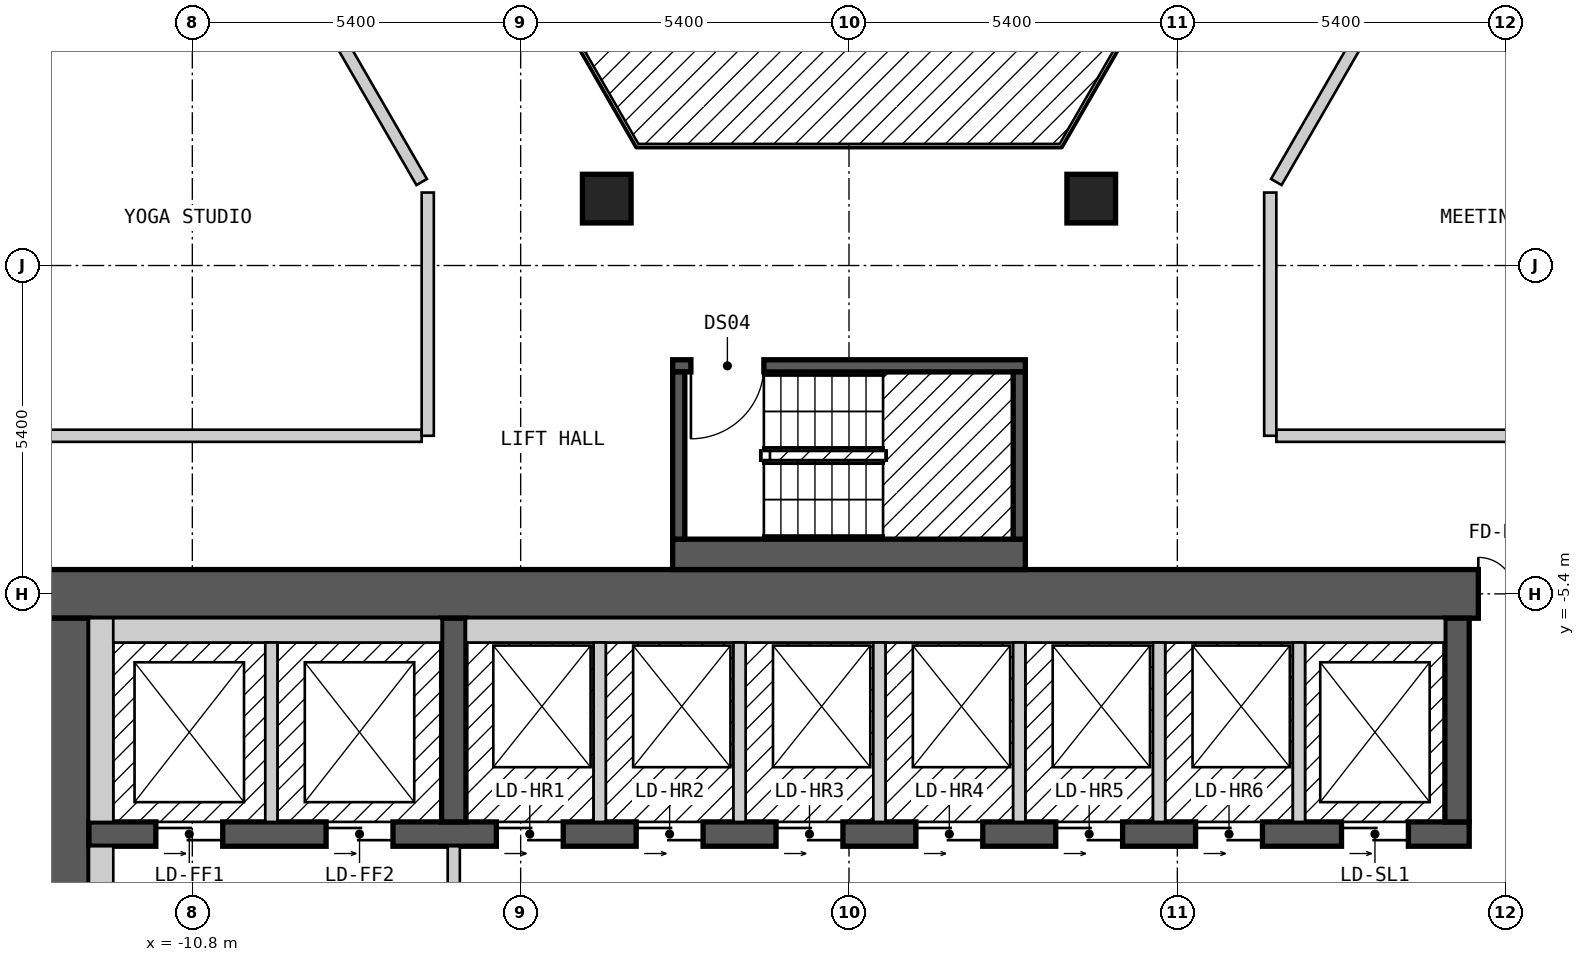
"""IFC4 building model, lengths in metres.
Left out: names, types, materials, properties, quantities, classifications, styles, units other than length and angle.
Written with IfcOpenShell. Run it as: python <this file> out.ifc"""

import sys

from ifc_helpers import new_model, si_unit, direction, frame, frame_2d, origin, origin_2d, place, context, subcontext, project, spatial, rectangle, extrude, element, fill, save


model = new_model("IFC4")
c1 = context("Model", 3, precision=1e-05, world=origin(), true_north=direction((0.0, 1.0)))
c2 = subcontext(c1, "Body", "Model", "MODEL_VIEW")
j1 = project(units=[si_unit("LENGTHUNIT", "METRE"), si_unit("PLANEANGLEUNIT", "RADIAN")], contexts=[c1])
p1 = place(None, origin())
s1 = spatial("IfcSite", under=j1, at=p1, CompositionType="ELEMENT")
p2 = place(p1, origin())
s2 = spatial("IfcBuilding", under=s1, at=p2, CompositionType="ELEMENT")
p3 = place(p2, frame((0.0, 0.0, 135.6)))
s3 = spatial("IfcBuildingStorey", under=s2, at=p3, CompositionType="ELEMENT", Elevation=135.6)
for number, where, z_axis, x_axis in (
    (1, (3.984, 1.1, 0.0), (0.0, 0.0, 1.0), (1.0, 0.0, 0.0)),
    (2, (-3.984, 1.1, 0.0), (0.0, 0.0, 1.0), (1.0, 0.0, 0.0)),
):
    element("IfcColumn", number, at=place(p3, frame(where, z_axis=z_axis, x_axis=x_axis)), inside=s3, PredefinedType="COLUMN", context=c2, shape_type="SweptSolid", body=[
        extrude(rectangle(XDim=0.8, YDim=0.8, at=origin_2d()), origin(), (0.0, 0.0, 1.0), 3.0),
    ])
p4 = place(p3, frame((-13.3, -5.4, 0.0), z_axis=(0.0, 0.0, 1.0), x_axis=(1.0, 0.0, 0.0)))
e3 = element("IfcWall", 3, at=p4, inside=s3, PredefinedType="SHEAR", context=c2, shape_type="SweptSolid", body=[
    extrude(rectangle(XDim=26.6, YDim=0.8, at=frame_2d((13.3, 0.0))), origin(), (0.0, 0.0, 1.0), 2.7),
])
p5 = place(p4, frame((23.65, 0.0, 0.0)))
e4 = element("IfcOpeningElement", 4, at=p5, cuts=e3, PredefinedType="OPENING", context=c2, shape_type="SweptSolid", body=[
    extrude(rectangle(XDim=1.2, YDim=2.1, at=frame_2d((0.6, 1.05))), frame((0.0, 0.41, 0.0), z_axis=(0.0, -1.0, 0.0), x_axis=(1.0, 0.0, 0.0)), (0.0, 0.0, 1.0), 0.82),
])
p6 = place(p3, frame((-12.9, -18.2, 0.0), z_axis=(0.0, 0.0, 1.0), x_axis=(0.0, 1.0, 0.0)))
e5 = element("IfcWall", 5, at=p6, inside=s3, PredefinedType="SHEAR", context=c2, shape_type="SweptSolid", body=[
    extrude(rectangle(XDim=12.4, YDim=0.8, at=frame_2d((6.2, 0.0))), origin(), (0.0, 0.0, 1.0), 2.7),
])
p7 = place(p6, frame((4.0, 0.0, 0.0)))
e6 = element("IfcOpeningElement", 6, at=p7, cuts=e5, PredefinedType="OPENING", context=c2, shape_type="SweptSolid", body=[
    extrude(rectangle(XDim=1.2, YDim=2.1, at=frame_2d((0.6, 1.05))), frame((0.0, 0.41, 0.0), z_axis=(0.0, -1.0, 0.0), x_axis=(1.0, 0.0, 0.0)), (0.0, 0.0, 1.0), 0.82),
])
p8 = place(p3, frame((-12.5, -9.35, 0.0), z_axis=(0.0, 0.0, 1.0), x_axis=(1.0, 0.0, 0.0)))
e7 = element("IfcWall", 7, at=p8, inside=s3, PredefinedType="SHEAR", context=c2, shape_type="SweptSolid", body=[
    extrude(rectangle(XDim=22.7, YDim=0.4, at=frame_2d((11.35, 0.0))), origin(), (0.0, 0.0, 1.0), 2.7),
])
p9 = place(p8, frame((1.1, 0.0, 0.0)))
e8 = element("IfcOpeningElement", 8, at=p9, cuts=e7, PredefinedType="OPENING", context=c2, shape_type="SweptSolid", body=[
    extrude(rectangle(XDim=1.1, YDim=2.1, at=frame_2d((0.55, 1.05))), frame((0.0, 0.21, 0.0), z_axis=(0.0, -1.0, 0.0), x_axis=(1.0, 0.0, 0.0)), (0.0, 0.0, 1.0), 0.42),
])
p10 = place(p8, frame((3.9, 0.0, 0.0)))
e9 = element("IfcOpeningElement", 9, at=p10, cuts=e7, PredefinedType="OPENING", context=c2, shape_type="SweptSolid", body=[
    extrude(rectangle(XDim=1.1, YDim=2.1, at=frame_2d((0.55, 1.05))), frame((0.0, 0.21, 0.0), z_axis=(0.0, -1.0, 0.0), x_axis=(1.0, 0.0, 0.0)), (0.0, 0.0, 1.0), 0.42),
])
p11 = place(p8, frame((6.7, 0.0, 0.0)))
e10 = element("IfcOpeningElement", 10, at=p11, cuts=e7, PredefinedType="OPENING", context=c2, shape_type="SweptSolid", body=[
    extrude(rectangle(XDim=1.1, YDim=2.1, at=frame_2d((0.55, 1.05))), frame((0.0, 0.21, 0.0), z_axis=(0.0, -1.0, 0.0), x_axis=(1.0, 0.0, 0.0)), (0.0, 0.0, 1.0), 0.42),
])
p12 = place(p8, frame((9.0, 0.0, 0.0)))
e11 = element("IfcOpeningElement", 11, at=p12, cuts=e7, PredefinedType="OPENING", context=c2, shape_type="SweptSolid", body=[
    extrude(rectangle(XDim=1.1, YDim=2.1, at=frame_2d((0.55, 1.05))), frame((0.0, 0.21, 0.0), z_axis=(0.0, -1.0, 0.0), x_axis=(1.0, 0.0, 0.0)), (0.0, 0.0, 1.0), 0.42),
])
p13 = place(p8, frame((11.3, 0.0, 0.0)))
e12 = element("IfcOpeningElement", 12, at=p13, cuts=e7, PredefinedType="OPENING", context=c2, shape_type="SweptSolid", body=[
    extrude(rectangle(XDim=1.1, YDim=2.1, at=frame_2d((0.55, 1.05))), frame((0.0, 0.21, 0.0), z_axis=(0.0, -1.0, 0.0), x_axis=(1.0, 0.0, 0.0)), (0.0, 0.0, 1.0), 0.42),
])
p14 = place(p8, frame((13.6, 0.0, 0.0)))
e13 = element("IfcOpeningElement", 13, at=p14, cuts=e7, PredefinedType="OPENING", context=c2, shape_type="SweptSolid", body=[
    extrude(rectangle(XDim=1.1, YDim=2.1, at=frame_2d((0.55, 1.05))), frame((0.0, 0.21, 0.0), z_axis=(0.0, -1.0, 0.0), x_axis=(1.0, 0.0, 0.0)), (0.0, 0.0, 1.0), 0.42),
])
p15 = place(p8, frame((15.9, 0.0, 0.0)))
e14 = element("IfcOpeningElement", 14, at=p15, cuts=e7, PredefinedType="OPENING", context=c2, shape_type="SweptSolid", body=[
    extrude(rectangle(XDim=1.1, YDim=2.1, at=frame_2d((0.55, 1.05))), frame((0.0, 0.21, 0.0), z_axis=(0.0, -1.0, 0.0), x_axis=(1.0, 0.0, 0.0)), (0.0, 0.0, 1.0), 0.42),
])
p16 = place(p8, frame((18.2, 0.0, 0.0)))
e15 = element("IfcOpeningElement", 15, at=p16, cuts=e7, PredefinedType="OPENING", context=c2, shape_type="SweptSolid", body=[
    extrude(rectangle(XDim=1.1, YDim=2.1, at=frame_2d((0.55, 1.05))), frame((0.0, 0.21, 0.0), z_axis=(0.0, -1.0, 0.0), x_axis=(1.0, 0.0, 0.0)), (0.0, 0.0, 1.0), 0.42),
])
p17 = place(p8, frame((20.6, 0.0, 0.0)))
e16 = element("IfcOpeningElement", 16, at=p17, cuts=e7, PredefinedType="OPENING", context=c2, shape_type="SweptSolid", body=[
    extrude(rectangle(XDim=1.1, YDim=2.1, at=frame_2d((0.55, 1.05))), frame((0.0, 0.21, 0.0), z_axis=(0.0, -1.0, 0.0), x_axis=(1.0, 0.0, 0.0)), (0.0, 0.0, 1.0), 0.42),
])
for number, where, z_axis, x_axis in (
    (17, (-6.5, -9.15, 0.0), (0.0, 0.0, 1.0), (0.0, 1.0, 0.0)),
    (18, (10.0, -9.15, 0.0), (0.0, 0.0, 1.0), (0.0, 1.0, 0.0)),
):
    element("IfcWall", number, at=place(p3, frame(where, z_axis=z_axis, x_axis=x_axis)), inside=s3, PredefinedType="SHEAR", context=c2, shape_type="SweptSolid", body=[
        extrude(rectangle(XDim=3.35, YDim=0.4, at=frame_2d((1.675, 0.0))), origin(), (0.0, 0.0, 1.0), 2.7),
    ])
p18 = place(p3, frame((-2.9, -4.75, 0.0), z_axis=(0.0, 0.0, 1.0), x_axis=(1.0, 0.0, 0.0)))
e19 = element("IfcWall", 19, at=p18, inside=s3, PredefinedType="SOLIDWALL", context=c2, shape_type="SweptSolid", body=[
    extrude(rectangle(XDim=5.8, YDim=0.5, at=frame_2d((2.9, 0.0))), origin(), (0.0, 0.0, 1.0), 2.7),
])
p19 = place(p3, frame((-2.9, -1.65, 0.0), z_axis=(0.0, 0.0, 1.0), x_axis=(1.0, 0.0, 0.0)))
e20 = element("IfcWall", 20, at=p19, inside=s3, PredefinedType="SOLIDWALL", context=c2, shape_type="SweptSolid", body=[
    extrude(rectangle(XDim=5.8, YDim=0.2, at=frame_2d((2.9, 0.0))), origin(), (0.0, 0.0, 1.0), 2.7),
])
p20 = place(p19, frame((0.3, 0.0, 0.0)))
e21 = element("IfcOpeningElement", 21, at=p20, cuts=e20, PredefinedType="OPENING", context=c2, shape_type="SweptSolid", body=[
    extrude(rectangle(XDim=1.2, YDim=2.1, at=frame_2d((0.6, 1.05))), frame((0.0, 0.11, 0.0), z_axis=(0.0, -1.0, 0.0), x_axis=(1.0, 0.0, 0.0)), (0.0, 0.0, 1.0), 0.22),
])
for number, where, z_axis, x_axis in (
    (22, (-2.8, -4.5, 0.0), (0.0, 0.0, 1.0), (0.0, 1.0, 0.0)),
    (23, (2.8, -4.5, 0.0), (0.0, 0.0, 1.0), (0.0, 1.0, 0.0)),
):
    element("IfcWall", number, at=place(p3, frame(where, z_axis=z_axis, x_axis=x_axis)), inside=s3, PredefinedType="SOLIDWALL", context=c2, shape_type="SweptSolid", body=[
        extrude(rectangle(XDim=2.75, YDim=0.2, at=frame_2d((1.375, 0.0))), origin(), (0.0, 0.0, 1.0), 2.7),
    ])
p21 = place(p3, frame((-10.796, 7.9, 0.0), z_axis=(0.0, 0.0, 1.0), x_axis=(0.499954271211, -0.866051803703, 0.0)))
e24 = element("IfcWall", 24, at=p21, inside=s3, PredefinedType="PARTITIONING", context=c2, shape_type="SweptSolid", body=[
    extrude(rectangle(XDim=7.536, YDim=0.2, at=frame_2d((3.768, 0.0))), origin(), (0.0, 0.0, 1.0), 2.7),
])
p22 = place(p3, frame((7.967, 13.0, 0.0), z_axis=(0.0, 0.0, 1.0), x_axis=(0.50003774998, -0.866003607726, 0.0)))
e25 = element("IfcWall", 25, at=p22, inside=s3, PredefinedType="PARTITIONING", context=c2, shape_type="SweptSolid", body=[
    extrude(rectangle(XDim=14.433, YDim=0.2, at=frame_2d((7.217, 0.0))), origin(), (0.0, 0.0, 1.0), 2.7),
])
p23 = place(p22, frame((6.824, 0.0, 0.0)))
e26 = element("IfcOpeningElement", 26, at=p23, cuts=e25, PredefinedType="OPENING", context=c2, shape_type="SweptSolid", body=[
    extrude(rectangle(XDim=0.9, YDim=2.1, at=frame_2d((0.45, 1.05))), frame((0.0, 0.11, 0.0), z_axis=(0.0, -1.0, 0.0), x_axis=(1.0, 0.0, 0.0)), (0.0, 0.0, 1.0), 0.22),
])
p24 = place(p3, frame((9.296, 15.1, 0.0), z_axis=(0.0, 0.0, 1.0), x_axis=(0.499974024244, -0.866040400375, 0.0)))
e27 = element("IfcWall", 27, at=p24, inside=s3, PredefinedType="PARTITIONING", context=c2, shape_type="SweptSolid", body=[
    extrude(rectangle(XDim=16.857, YDim=0.2, at=frame_2d((8.429, 0.0))), origin(), (0.0, 0.0, 1.0), 2.7),
])
p25 = place(p24, frame((5.209, 0.0, 0.0)))
e28 = element("IfcOpeningElement", 28, at=p25, cuts=e27, PredefinedType="OPENING", context=c2, shape_type="SweptSolid", body=[
    extrude(rectangle(XDim=1.0, YDim=2.1, at=frame_2d((0.5, 1.05))), frame((0.0, 0.11, 0.0), z_axis=(0.0, -1.0, 0.0), x_axis=(1.0, 0.0, 0.0)), (0.0, 0.0, 1.0), 0.22),
])
p26 = place(p3, frame((-13.395, -2.8, 0.0), z_axis=(0.0, 0.0, 1.0), x_axis=(1.0, 0.0, 0.0)))
e29 = element("IfcWall", 29, at=p26, inside=s3, PredefinedType="PARTITIONING", context=c2, shape_type="SweptSolid", body=[
    extrude(rectangle(XDim=6.367, YDim=0.2, at=frame_2d((3.184, 0.0))), origin(), (0.0, 0.0, 1.0), 2.7),
])
p27 = place(p3, frame((7.028, -2.8, 0.0), z_axis=(0.0, 0.0, 1.0), x_axis=(1.0, 0.0, 0.0)))
e30 = element("IfcWall", 30, at=p27, inside=s3, PredefinedType="PARTITIONING", context=c2, shape_type="SweptSolid", body=[
    extrude(rectangle(XDim=6.25, YDim=0.2, at=frame_2d((3.125, 0.0))), origin(), (0.0, 0.0, 1.0), 2.7),
])
p28 = place(p3, frame((7.028, 1.373, 0.0), z_axis=(0.0, 0.0, 1.0), x_axis=(0.499954271211, 0.866051803703, 0.0)))
e31 = element("IfcWall", 31, at=p28, inside=s3, PredefinedType="PARTITIONING", context=c2, shape_type="SweptSolid", body=[
    extrude(rectangle(XDim=7.536, YDim=0.2, at=frame_2d((3.768, 0.0))), origin(), (0.0, 0.0, 1.0), 2.7),
])
p29 = place(p3, frame((-15.242, 0.399, 0.0), z_axis=(0.0, 0.0, 1.0), x_axis=(0.499953615651, 0.866052182145, 0.0)))
e32 = element("IfcWall", 32, at=p29, inside=s3, PredefinedType="PARTITIONING", context=c2, shape_type="SweptSolid", body=[
    extrude(rectangle(XDim=8.777, YDim=0.2, at=frame_2d((4.388, 0.0))), origin(), (0.0, 0.0, 1.0), 2.7),
])
p30 = place(p29, frame((3.938, 0.0, 0.0)))
e33 = element("IfcOpeningElement", 33, at=p30, cuts=e32, PredefinedType="OPENING", context=c2, shape_type="SweptSolid", body=[
    extrude(rectangle(XDim=0.9, YDim=2.1, at=frame_2d((0.45, 1.05))), frame((0.0, 0.11, 0.0), z_axis=(0.0, -1.0, 0.0), x_axis=(1.0, 0.0, 0.0)), (0.0, 0.0, 1.0), 0.22),
])
p31 = place(p3, frame((-17.724, 0.5, 0.0), z_axis=(0.0, 0.0, 1.0), x_axis=(0.499994801602, 0.86602840506, 0.0)))
e34 = element("IfcWall", 34, at=p31, inside=s3, PredefinedType="PARTITIONING", context=c2, shape_type="SweptSolid", body=[
    extrude(rectangle(XDim=16.916, YDim=0.2, at=frame_2d((8.458, 0.0))), origin(), (0.0, 0.0, 1.0), 2.7),
])
p32 = place(p31, frame((10.672, 0.0, 0.0)))
e35 = element("IfcOpeningElement", 35, at=p32, cuts=e34, PredefinedType="OPENING", context=c2, shape_type="SweptSolid", body=[
    extrude(rectangle(XDim=1.0, YDim=2.1, at=frame_2d((0.5, 1.05))), frame((0.0, 0.11, 0.0), z_axis=(0.0, -1.0, 0.0), x_axis=(1.0, 0.0, 0.0)), (0.0, 0.0, 1.0), 0.22),
])
p33 = place(p31, frame((5.187, 0.0, 0.0)))
e36 = element("IfcOpeningElement", 36, at=p33, cuts=e34, PredefinedType="OPENING", context=c2, shape_type="SweptSolid", body=[
    extrude(rectangle(XDim=1.0, YDim=2.1, at=frame_2d((0.5, 1.05))), frame((0.0, 0.11, 0.0), z_axis=(0.0, -1.0, 0.0), x_axis=(1.0, 0.0, 0.0)), (0.0, 0.0, 1.0), 0.22),
])
p34 = place(p31, frame((0.566, 0.0, 0.0)))
e37 = element("IfcOpeningElement", 37, at=p34, cuts=e34, PredefinedType="OPENING", context=c2, shape_type="SweptSolid", body=[
    extrude(rectangle(XDim=1.0, YDim=2.1, at=frame_2d((0.5, 1.05))), frame((0.0, 0.11, 0.0), z_axis=(0.0, -1.0, 0.0), x_axis=(1.0, 0.0, 0.0)), (0.0, 0.0, 1.0), 0.22),
])
for number, where, z_axis, x_axis in (
    (38, (6.928, -2.8, 0.0), (0.0, 0.0, 1.0), (0.0, 1.0, 0.0)),
    (39, (-6.928, -2.8, 0.0), (0.0, 0.0, 1.0), (0.0, 1.0, 0.0)),
):
    element("IfcWall", number, at=place(p3, frame(where, z_axis=z_axis, x_axis=x_axis)), inside=s3, PredefinedType="PARTITIONING", context=c2, shape_type="SweptSolid", body=[
        extrude(rectangle(XDim=4.0, YDim=0.2, at=frame_2d((2.0, 0.0))), origin(), (0.0, 0.0, 1.0), 2.7),
    ])
p35 = place(p3, frame((-12.3, -13.0, 0.0), z_axis=(0.0, 0.0, 1.0), x_axis=(0.0, 1.0, 0.0)))
e40 = element("IfcWall", 40, at=p35, inside=s3, PredefinedType="PARTITIONING", context=c2, shape_type="SweptSolid", body=[
    extrude(rectangle(XDim=3.45, YDim=0.4, at=frame_2d((1.725, 0.0))), origin(), (0.0, 0.0, 1.0), 2.7),
])
p36 = place(p3, frame((-12.3, -9.15, 0.0), z_axis=(0.0, 0.0, 1.0), x_axis=(0.0, 1.0, 0.0)))
e41 = element("IfcWall", 41, at=p36, inside=s3, PredefinedType="SOLIDWALL", context=c2, shape_type="SweptSolid", body=[
    extrude(rectangle(XDim=3.35, YDim=0.4, at=frame_2d((1.675, 0.0))), origin(), (0.0, 0.0, 1.0), 2.7),
])
p37 = place(p3, frame((-12.1, -6.0, 0.0), z_axis=(0.0, 0.0, 1.0), x_axis=(1.0, 0.0, 0.0)))
e42 = element("IfcWall", 42, at=p37, inside=s3, PredefinedType="SOLIDWALL", context=c2, shape_type="SweptSolid", body=[
    extrude(rectangle(XDim=5.4, YDim=0.4, at=frame_2d((2.7, 0.0))), origin(), (0.0, 0.0, 1.0), 2.7),
])
p38 = place(p3, frame((-9.5, -9.15, 0.0), z_axis=(0.0, 0.0, 1.0), x_axis=(0.0, 1.0, 0.0)))
e43 = element("IfcWall", 43, at=p38, inside=s3, PredefinedType="SOLIDWALL", context=c2, shape_type="SweptSolid", body=[
    extrude(rectangle(XDim=2.95, YDim=0.2, at=frame_2d((1.475, 0.0))), origin(), (0.0, 0.0, 1.0), 2.7),
])
p39 = place(p3, frame((-6.5, -14.45, 0.0), z_axis=(0.0, 0.0, 1.0), x_axis=(0.0, 1.0, 0.0)))
e44 = element("IfcWall", 44, at=p39, inside=s3, PredefinedType="PARTITIONING", context=c2, shape_type="SweptSolid", body=[
    extrude(rectangle(XDim=4.9, YDim=0.2, at=frame_2d((2.45, 0.0))), origin(), (0.0, 0.0, 1.0), 2.7),
])
p40 = place(p39, frame((3.15, 0.0, 0.0), z_axis=(0.0, 0.0, 1.0), x_axis=(-1.0, 0.0, 0.0)))
e45 = element("IfcOpeningElement", 45, at=p40, cuts=e44, PredefinedType="OPENING", context=c2, shape_type="SweptSolid", body=[
    extrude(rectangle(XDim=1.4, YDim=2.1, at=frame_2d((0.7, 1.05))), frame((0.0, 0.11, 0.0), z_axis=(0.0, -1.0, 0.0), x_axis=(1.0, 0.0, 0.0)), (0.0, 0.0, 1.0), 0.22),
])
p41 = place(p3, frame((-6.3, -6.0, 0.0), z_axis=(0.0, 0.0, 1.0), x_axis=(1.0, 0.0, 0.0)))
e46 = element("IfcWall", 46, at=p41, inside=s3, PredefinedType="SOLIDWALL", context=c2, shape_type="SweptSolid", body=[
    extrude(rectangle(XDim=16.1, YDim=0.4, at=frame_2d((8.05, 0.0))), origin(), (0.0, 0.0, 1.0), 2.7),
])
for number, where, z_axis, x_axis in (
    (47, (-4.1, -9.15, 0.0), (0.0, 0.0, 1.0), (0.0, 1.0, 0.0)),
    (48, (-1.8, -9.15, 0.0), (0.0, 0.0, 1.0), (0.0, 1.0, 0.0)),
    (49, (0.5, -9.15, 0.0), (0.0, 0.0, 1.0), (0.0, 1.0, 0.0)),
    (50, (2.8, -9.15, 0.0), (0.0, 0.0, 1.0), (0.0, 1.0, 0.0)),
    (51, (5.1, -9.15, 0.0), (0.0, 0.0, 1.0), (0.0, 1.0, 0.0)),
    (52, (7.4, -9.15, 0.0), (0.0, 0.0, 1.0), (0.0, 1.0, 0.0)),
):
    element("IfcWall", number, at=place(p3, frame(where, z_axis=z_axis, x_axis=x_axis)), inside=s3, PredefinedType="SOLIDWALL", context=c2, shape_type="SweptSolid", body=[
        extrude(rectangle(XDim=2.95, YDim=0.2, at=frame_2d((1.475, 0.0))), origin(), (0.0, 0.0, 1.0), 2.7),
    ])
p42 = place(p20, origin())
e53 = element("IfcDoor", 53, at=p42, inside=s3, OperationType="SINGLE_SWING_LEFT", PredefinedType="DOOR", context=c2, shape_type="SweptSolid", body=[
    extrude(rectangle(XDim=1.2, YDim=2.1, at=frame_2d((0.6, 1.05))), frame((0.0, 0.025, 0.0), z_axis=(0.0, -1.0, 0.0), x_axis=(1.0, 0.0, 0.0)), (0.0, 0.0, 1.0), 0.05),
])
fill(e21, e53)
p43 = place(p9, origin())
e54 = element("IfcDoor", 54, at=p43, inside=s3, OperationType="DOUBLE_DOOR_SLIDING", PredefinedType="DOOR", context=c2, shape_type="SweptSolid", body=[
    extrude(rectangle(XDim=1.1, YDim=2.1, at=frame_2d((0.55, 1.05))), frame((0.0, 0.025, 0.0), z_axis=(0.0, -1.0, 0.0), x_axis=(1.0, 0.0, 0.0)), (0.0, 0.0, 1.0), 0.05),
])
fill(e8, e54)
p44 = place(p10, origin())
e55 = element("IfcDoor", 55, at=p44, inside=s3, OperationType="DOUBLE_DOOR_SLIDING", PredefinedType="DOOR", context=c2, shape_type="SweptSolid", body=[
    extrude(rectangle(XDim=1.1, YDim=2.1, at=frame_2d((0.55, 1.05))), frame((0.0, 0.025, 0.0), z_axis=(0.0, -1.0, 0.0), x_axis=(1.0, 0.0, 0.0)), (0.0, 0.0, 1.0), 0.05),
])
fill(e9, e55)
p45 = place(p11, origin())
e56 = element("IfcDoor", 56, at=p45, inside=s3, OperationType="DOUBLE_DOOR_SLIDING", PredefinedType="DOOR", context=c2, shape_type="SweptSolid", body=[
    extrude(rectangle(XDim=1.1, YDim=2.1, at=frame_2d((0.55, 1.05))), frame((0.0, 0.025, 0.0), z_axis=(0.0, -1.0, 0.0), x_axis=(1.0, 0.0, 0.0)), (0.0, 0.0, 1.0), 0.05),
])
fill(e10, e56)
p46 = place(p12, origin())
e57 = element("IfcDoor", 57, at=p46, inside=s3, OperationType="DOUBLE_DOOR_SLIDING", PredefinedType="DOOR", context=c2, shape_type="SweptSolid", body=[
    extrude(rectangle(XDim=1.1, YDim=2.1, at=frame_2d((0.55, 1.05))), frame((0.0, 0.025, 0.0), z_axis=(0.0, -1.0, 0.0), x_axis=(1.0, 0.0, 0.0)), (0.0, 0.0, 1.0), 0.05),
])
fill(e11, e57)
p47 = place(p13, origin())
e58 = element("IfcDoor", 58, at=p47, inside=s3, OperationType="DOUBLE_DOOR_SLIDING", PredefinedType="DOOR", context=c2, shape_type="SweptSolid", body=[
    extrude(rectangle(XDim=1.1, YDim=2.1, at=frame_2d((0.55, 1.05))), frame((0.0, 0.025, 0.0), z_axis=(0.0, -1.0, 0.0), x_axis=(1.0, 0.0, 0.0)), (0.0, 0.0, 1.0), 0.05),
])
fill(e12, e58)
p48 = place(p14, origin())
e59 = element("IfcDoor", 59, at=p48, inside=s3, OperationType="DOUBLE_DOOR_SLIDING", PredefinedType="DOOR", context=c2, shape_type="SweptSolid", body=[
    extrude(rectangle(XDim=1.1, YDim=2.1, at=frame_2d((0.55, 1.05))), frame((0.0, 0.025, 0.0), z_axis=(0.0, -1.0, 0.0), x_axis=(1.0, 0.0, 0.0)), (0.0, 0.0, 1.0), 0.05),
])
fill(e13, e59)
p49 = place(p15, origin())
e60 = element("IfcDoor", 60, at=p49, inside=s3, OperationType="DOUBLE_DOOR_SLIDING", PredefinedType="DOOR", context=c2, shape_type="SweptSolid", body=[
    extrude(rectangle(XDim=1.1, YDim=2.1, at=frame_2d((0.55, 1.05))), frame((0.0, 0.025, 0.0), z_axis=(0.0, -1.0, 0.0), x_axis=(1.0, 0.0, 0.0)), (0.0, 0.0, 1.0), 0.05),
])
fill(e14, e60)
p50 = place(p16, origin())
e61 = element("IfcDoor", 61, at=p50, inside=s3, OperationType="DOUBLE_DOOR_SLIDING", PredefinedType="DOOR", context=c2, shape_type="SweptSolid", body=[
    extrude(rectangle(XDim=1.1, YDim=2.1, at=frame_2d((0.55, 1.05))), frame((0.0, 0.025, 0.0), z_axis=(0.0, -1.0, 0.0), x_axis=(1.0, 0.0, 0.0)), (0.0, 0.0, 1.0), 0.05),
])
fill(e15, e61)
p51 = place(p17, origin())
e62 = element("IfcDoor", 62, at=p51, inside=s3, OperationType="DOUBLE_DOOR_SLIDING", PredefinedType="DOOR", context=c2, shape_type="SweptSolid", body=[
    extrude(rectangle(XDim=1.1, YDim=2.1, at=frame_2d((0.55, 1.05))), frame((0.0, 0.025, 0.0), z_axis=(0.0, -1.0, 0.0), x_axis=(1.0, 0.0, 0.0)), (0.0, 0.0, 1.0), 0.05),
])
fill(e16, e62)
p52 = place(p5, origin())
e63 = element("IfcDoor", 63, at=p52, inside=s3, OperationType="DOUBLE_DOOR_SINGLE_SWING", PredefinedType="DOOR", context=c2, shape_type="SweptSolid", body=[
    extrude(rectangle(XDim=1.2, YDim=2.1, at=frame_2d((0.6, 1.05))), frame((0.0, 0.025, 0.0), z_axis=(0.0, -1.0, 0.0), x_axis=(1.0, 0.0, 0.0)), (0.0, 0.0, 1.0), 0.05),
])
fill(e4, e63)
save(model, sys.argv[1])
